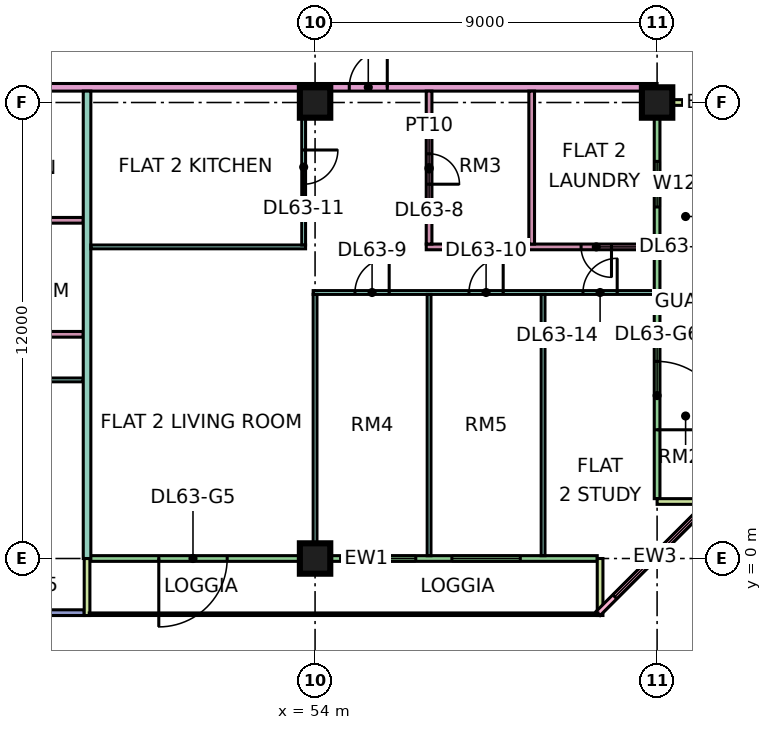
"""IFC4 building model, lengths in metres.
Left out: names, types, materials, properties, quantities, classifications, styles, units other than length and angle.
Written with IfcOpenShell. Run it as: python <this file> out.ifc"""

import sys

from ifc_helpers import new_model, si_unit, direction, frame, frame_2d, origin, origin_2d, place, context, subcontext, project, spatial, rectangle, extrude, element, fill, save


model = new_model("IFC4")
c1 = context("Model", 3, precision=1e-05, world=origin(), true_north=direction((0.0, 1.0)))
c2 = subcontext(c1, "Body", "Model", "MODEL_VIEW")
j1 = project(units=[si_unit("LENGTHUNIT", "METRE"), si_unit("PLANEANGLEUNIT", "RADIAN")], contexts=[c1])
p1 = place(None, origin())
s1 = spatial("IfcSite", under=j1, at=p1, CompositionType="ELEMENT")
p2 = place(p1, origin())
s2 = spatial("IfcBuilding", under=s1, at=p2, CompositionType="ELEMENT")
p3 = place(p2, frame((0.0, 0.0, 273.4)))
s3 = spatial("IfcBuildingStorey", under=s2, at=p3, CompositionType="ELEMENT", Elevation=273.4)
for number, where, z_axis, x_axis in (
    (1, (54.0, 0.0, 0.0), (0.0, 0.0, 1.0), (1.0, 0.0, 0.0)),
    (2, (54.0, 12.0, 0.0), (0.0, 0.0, 1.0), (1.0, 0.0, 0.0)),
    (3, (63.0, 12.0, 0.0), (0.0, 0.0, 1.0), (1.0, 0.0, 0.0)),
):
    element("IfcColumn", number, at=place(p3, frame(where, z_axis=z_axis, x_axis=x_axis)), inside=s3, PredefinedType="COLUMN", context=c2, shape_type="SweptSolid", body=[
        extrude(rectangle(XDim=0.8, YDim=0.8, at=origin_2d()), origin(), (0.0, 0.0, 1.0), 3.75),
    ])
p4 = place(p3, frame((36.075, -1.425, 0.0), z_axis=(0.0, 0.0, 1.0), x_axis=(1.0, 0.0, 0.0)))
e4 = element("IfcWall", 4, at=p4, inside=s3, PredefinedType="SOLIDWALL", context=c2, shape_type="SweptSolid", body=[
    extrude(rectangle(XDim=11.85, YDim=0.15, at=frame_2d((5.925, 0.0))), origin(), (0.0, 0.0, 1.0), 3.35),
])
p5 = place(p4, frame((0.562, 0.0, 0.45)))
e5 = element("IfcOpeningElement", 5, at=p5, cuts=e4, PredefinedType="OPENING", context=c2, shape_type="SweptSolid", body=[
    extrude(rectangle(XDim=1.8, YDim=2.4, at=frame_2d((0.9, 1.2))), frame((0.0, 0.085, 0.0), z_axis=(0.0, -1.0, 0.0), x_axis=(1.0, 0.0, 0.0)), (0.0, 0.0, 1.0), 0.17),
])
p6 = place(p4, frame((5.887, 0.0, 0.45)))
e6 = element("IfcOpeningElement", 6, at=p6, cuts=e4, PredefinedType="OPENING", context=c2, shape_type="SweptSolid", body=[
    extrude(rectangle(XDim=3.0, YDim=2.4, at=frame_2d((1.5, 1.2))), frame((0.0, 0.085, 0.0), z_axis=(0.0, -1.0, 0.0), x_axis=(1.0, 0.0, 0.0)), (0.0, 0.0, 1.0), 0.17),
])
p7 = place(p3, frame((48.075, 0.0, 0.0), z_axis=(0.0, 0.0, 1.0), x_axis=(1.0, 0.0, 0.0)))
e7 = element("IfcWall", 7, at=p7, inside=s3, PredefinedType="SOLIDWALL", context=c2, shape_type="SweptSolid", body=[
    extrude(rectangle(XDim=13.35, YDim=0.15, at=frame_2d((6.675, 0.0))), origin(), (0.0, 0.0, 1.0), 3.35),
])
p8 = place(p7, frame((1.812, 0.0, 0.0)))
e8 = element("IfcOpeningElement", 8, at=p8, cuts=e7, PredefinedType="OPENING", context=c2, shape_type="SweptSolid", body=[
    extrude(rectangle(XDim=1.8, YDim=2.4, at=frame_2d((0.9, 1.2))), frame((0.0, 0.085, 0.0), z_axis=(0.0, -1.0, 0.0), x_axis=(1.0, 0.0, 0.0)), (0.0, 0.0, 1.0), 0.17),
])
p9 = place(p7, frame((6.775, 0.0, 0.45)))
e9 = element("IfcOpeningElement", 9, at=p9, cuts=e7, PredefinedType="OPENING", context=c2, shape_type="SweptSolid", body=[
    extrude(rectangle(XDim=1.8, YDim=2.4, at=frame_2d((0.9, 1.2))), frame((0.0, 0.085, 0.0), z_axis=(0.0, -1.0, 0.0), x_axis=(1.0, 0.0, 0.0)), (0.0, 0.0, 1.0), 0.17),
])
p10 = place(p7, frame((9.525, 0.0, 0.45)))
e10 = element("IfcOpeningElement", 10, at=p10, cuts=e7, PredefinedType="OPENING", context=c2, shape_type="SweptSolid", body=[
    extrude(rectangle(XDim=1.8, YDim=2.4, at=frame_2d((0.9, 1.2))), frame((0.0, 0.085, 0.0), z_axis=(0.0, -1.0, 0.0), x_axis=(1.0, 0.0, 0.0)), (0.0, 0.0, 1.0), 0.17),
])
for number, where, z_axis, x_axis in (
    (11, (48.0, -1.5, 0.0), (0.0, 0.0, 1.0), (0.0, 1.0, 0.0)),
    (12, (61.5, -1.5, 0.0), (0.0, 0.0, 1.0), (0.0, 1.0, 0.0)),
):
    element("IfcWall", number, at=place(p3, frame(where, z_axis=z_axis, x_axis=x_axis)), inside=s3, PredefinedType="SOLIDWALL", context=c2, shape_type="SweptSolid", body=[
        extrude(rectangle(XDim=1.5, YDim=0.15, at=frame_2d((0.75, 0.0))), origin(), (0.0, 0.0, 1.0), 3.35),
    ])
p11 = place(p3, frame((61.447, -1.447, 0.0), z_axis=(0.0, 0.0, 1.0), x_axis=(0.707106781187, 0.707106781187, 0.0)))
e13 = element("IfcWall", 13, at=p11, inside=s3, PredefinedType="SOLIDWALL", context=c2, shape_type="SweptSolid", body=[
    extrude(rectangle(XDim=4.243, YDim=0.15, at=frame_2d((2.121, 0.0))), origin(), (0.0, 0.0, 1.0), 3.35),
])
p12 = place(p11, frame((0.621, 0.0, 0.45)))
e14 = element("IfcOpeningElement", 14, at=p12, cuts=e13, PredefinedType="OPENING", context=c2, shape_type="SweptSolid", body=[
    extrude(rectangle(XDim=3.0, YDim=2.4, at=frame_2d((1.5, 1.2))), frame((0.0, 0.085, 0.0), z_axis=(0.0, -1.0, 0.0), x_axis=(1.0, 0.0, 0.0)), (0.0, 0.0, 1.0), 0.17),
])
p13 = place(p3, frame((63.0, 1.575, 0.0), z_axis=(0.0, 0.0, 1.0), x_axis=(0.0, 1.0, 0.0)))
e15 = element("IfcWall", 15, at=p13, inside=s3, PredefinedType="SOLIDWALL", context=c2, shape_type="SweptSolid", body=[
    extrude(rectangle(XDim=10.35, YDim=0.15, at=frame_2d((5.175, 0.0))), origin(), (0.0, 0.0, 1.0), 3.35),
])
p14 = place(p13, frame((1.812, 0.0, 0.0)))
e16 = element("IfcOpeningElement", 16, at=p14, cuts=e15, PredefinedType="OPENING", context=c2, shape_type="SweptSolid", body=[
    extrude(rectangle(XDim=1.8, YDim=2.4, at=frame_2d((0.9, 1.2))), frame((0.0, 0.085, 0.0), z_axis=(0.0, -1.0, 0.0), x_axis=(1.0, 0.0, 0.0)), (0.0, 0.0, 1.0), 0.17),
])
p15 = place(p13, frame((7.675, 0.0, 1.7)))
e17 = element("IfcOpeningElement", 17, at=p15, cuts=e15, PredefinedType="OPENING", context=c2, shape_type="SweptSolid", body=[
    extrude(rectangle(XDim=1.2, YDim=0.9, at=frame_2d((0.6, 0.45))), frame((0.0, 0.085, 0.0), z_axis=(0.0, -1.0, 0.0), x_axis=(1.0, 0.0, 0.0)), (0.0, 0.0, 1.0), 0.17),
])
for number, where, z_axis, x_axis in (
    (18, (64.5, 1.5, 0.0), (0.0, 0.0, 1.0), (-1.0, 0.0, 0.0)),
    (19, (64.5, 12.0, 0.0), (0.0, 0.0, 1.0), (-1.0, 0.0, 0.0)),
):
    element("IfcWall", number, at=place(p3, frame(where, z_axis=z_axis, x_axis=x_axis)), inside=s3, PredefinedType="SOLIDWALL", context=c2, shape_type="SweptSolid", body=[
        extrude(rectangle(XDim=1.5, YDim=0.15, at=frame_2d((0.75, 0.0))), origin(), (0.0, 0.0, 1.0), 3.35),
    ])
p16 = place(p3, frame((33.05, 4.7, 0.0), z_axis=(0.0, 0.0, 1.0), x_axis=(1.0, 0.0, 0.0)))
e20 = element("IfcWall", 20, at=p16, inside=s3, PredefinedType="PARTITIONING", context=c2, shape_type="SweptSolid", body=[
    extrude(rectangle(XDim=14.85, YDim=0.1, at=frame_2d((7.425, 0.0))), origin(), (0.0, 0.0, 1.0), 3.35),
])
p17 = place(p16, frame((1.0, 0.0, 0.0)))
e21 = element("IfcOpeningElement", 21, at=p17, cuts=e20, PredefinedType="OPENING", context=c2, shape_type="SweptSolid", body=[
    extrude(rectangle(XDim=0.9, YDim=2.1, at=frame_2d((0.45, 1.05))), frame((0.0, 0.06, 0.0), z_axis=(0.0, -1.0, 0.0), x_axis=(1.0, 0.0, 0.0)), (0.0, 0.0, 1.0), 0.12),
])
p18 = place(p16, frame((4.0, 0.0, 0.0)))
e22 = element("IfcOpeningElement", 22, at=p18, cuts=e20, PredefinedType="OPENING", context=c2, shape_type="SweptSolid", body=[
    extrude(rectangle(XDim=0.9, YDim=2.1, at=frame_2d((0.45, 1.05))), frame((0.0, 0.06, 0.0), z_axis=(0.0, -1.0, 0.0), x_axis=(1.0, 0.0, 0.0)), (0.0, 0.0, 1.0), 0.12),
])
p19 = place(p16, frame((10.0, 0.0, 0.0)))
e23 = element("IfcOpeningElement", 23, at=p19, cuts=e20, PredefinedType="OPENING", context=c2, shape_type="SweptSolid", body=[
    extrude(rectangle(XDim=0.9, YDim=2.1, at=frame_2d((0.45, 1.05))), frame((0.0, 0.06, 0.0), z_axis=(0.0, -1.0, 0.0), x_axis=(1.0, 0.0, 0.0)), (0.0, 0.0, 1.0), 0.12),
])
p20 = place(p3, frame((40.65, 12.4, 0.0), z_axis=(0.0, 0.0, 1.0), x_axis=(1.0, 0.0, 0.0)))
e24 = element("IfcWall", 24, at=p20, inside=s3, PredefinedType="PARTITIONING", context=c2, shape_type="SweptSolid", body=[
    extrude(rectangle(XDim=22.35, YDim=0.2, at=frame_2d((11.175, 0.0))), origin(), (0.0, 0.0, 1.0), 3.35),
])
p21 = place(p20, frame((14.25, 0.0, 0.0)))
e25 = element("IfcOpeningElement", 25, at=p21, cuts=e24, PredefinedType="OPENING", context=c2, shape_type="SweptSolid", body=[
    extrude(rectangle(XDim=1.0, YDim=2.1, at=frame_2d((0.5, 1.05))), frame((0.0, 0.11, 0.0), z_axis=(0.0, -1.0, 0.0), x_axis=(1.0, 0.0, 0.0)), (0.0, 0.0, 1.0), 0.22),
])
p22 = place(p20, frame((1.05, 0.0, 0.0)))
e26 = element("IfcOpeningElement", 26, at=p22, cuts=e24, PredefinedType="OPENING", context=c2, shape_type="SweptSolid", body=[
    extrude(rectangle(XDim=1.0, YDim=2.1, at=frame_2d((0.5, 1.05))), frame((0.0, 0.11, 0.0), z_axis=(0.0, -1.0, 0.0), x_axis=(1.0, 0.0, 0.0)), (0.0, 0.0, 1.0), 0.22),
])
p23 = place(p3, frame((43.725, 5.9, 0.0), z_axis=(0.0, 0.0, 1.0), x_axis=(1.0, 0.0, 0.0)))
e27 = element("IfcWall", 27, at=p23, inside=s3, PredefinedType="PARTITIONING", context=c2, shape_type="SweptSolid", body=[
    extrude(rectangle(XDim=4.175, YDim=0.15, at=frame_2d((2.087, 0.0))), origin(), (0.0, 0.0, 1.0), 3.35),
])
p24 = place(p23, frame((1.675, 0.0, 0.0)))
e28 = element("IfcOpeningElement", 28, at=p24, cuts=e27, PredefinedType="OPENING", context=c2, shape_type="SweptSolid", body=[
    extrude(rectangle(XDim=0.8, YDim=2.1, at=frame_2d((0.4, 1.05))), frame((0.0, 0.085, 0.0), z_axis=(0.0, -1.0, 0.0), x_axis=(1.0, 0.0, 0.0)), (0.0, 0.0, 1.0), 0.17),
])
p25 = place(p3, frame((43.725, 8.9, 0.0), z_axis=(0.0, 0.0, 1.0), x_axis=(1.0, 0.0, 0.0)))
e29 = element("IfcWall", 29, at=p25, inside=s3, PredefinedType="PARTITIONING", context=c2, shape_type="SweptSolid", body=[
    extrude(rectangle(XDim=4.175, YDim=0.15, at=frame_2d((2.087, 0.0))), origin(), (0.0, 0.0, 1.0), 3.35),
])
p26 = place(p3, frame((48.0, 0.0, 0.0), z_axis=(0.0, 0.0, 1.0), x_axis=(0.0, 1.0, 0.0)))
e30 = element("IfcWall", 30, at=p26, inside=s3, PredefinedType="PARTITIONING", context=c2, shape_type="SweptSolid", body=[
    extrude(rectangle(XDim=12.3, YDim=0.2, at=frame_2d((6.15, 0.0))), origin(), (0.0, 0.0, 1.0), 3.35),
])
p27 = place(p3, frame((48.1, 8.2, 0.0), z_axis=(0.0, 0.0, 1.0), x_axis=(1.0, 0.0, 0.0)))
e31 = element("IfcWall", 31, at=p27, inside=s3, PredefinedType="PARTITIONING", context=c2, shape_type="SweptSolid", body=[
    extrude(rectangle(XDim=5.65, YDim=0.1, at=frame_2d((2.825, 0.0))), origin(), (0.0, 0.0, 1.0), 3.35),
])
p28 = place(p3, frame((53.7, 8.25, 0.0), z_axis=(0.0, 0.0, 1.0), x_axis=(0.0, 1.0, 0.0)))
e32 = element("IfcWall", 32, at=p28, inside=s3, PredefinedType="PARTITIONING", context=c2, shape_type="SweptSolid", body=[
    extrude(rectangle(XDim=4.05, YDim=0.1, at=frame_2d((2.025, 0.0))), origin(), (0.0, 0.0, 1.0), 3.35),
])
p29 = place(p28, frame((1.6, 0.0, 0.0)))
e33 = element("IfcOpeningElement", 33, at=p29, cuts=e32, PredefinedType="OPENING", context=c2, shape_type="SweptSolid", body=[
    extrude(rectangle(XDim=0.9, YDim=2.1, at=frame_2d((0.45, 1.05))), frame((0.0, 0.06, 0.0), z_axis=(0.0, -1.0, 0.0), x_axis=(1.0, 0.0, 0.0)), (0.0, 0.0, 1.0), 0.12),
])
p30 = place(p3, frame((53.95, 7.0, 0.0), z_axis=(0.0, 0.0, 1.0), x_axis=(1.0, 0.0, 0.0)))
e34 = element("IfcWall", 34, at=p30, inside=s3, PredefinedType="PARTITIONING", context=c2, shape_type="SweptSolid", body=[
    extrude(rectangle(XDim=8.976, YDim=0.1, at=frame_2d((4.488, 0.0))), origin(), (0.0, 0.0, 1.0), 3.35),
])
p31 = place(p30, frame((1.1, 0.0, 0.0)))
e35 = element("IfcOpeningElement", 35, at=p31, cuts=e34, PredefinedType="OPENING", context=c2, shape_type="SweptSolid", body=[
    extrude(rectangle(XDim=0.9, YDim=2.1, at=frame_2d((0.45, 1.05))), frame((0.0, 0.06, 0.0), z_axis=(0.0, -1.0, 0.0), x_axis=(1.0, 0.0, 0.0)), (0.0, 0.0, 1.0), 0.12),
])
p32 = place(p30, frame((4.1, 0.0, 0.0)))
e36 = element("IfcOpeningElement", 36, at=p32, cuts=e34, PredefinedType="OPENING", context=c2, shape_type="SweptSolid", body=[
    extrude(rectangle(XDim=0.9, YDim=2.1, at=frame_2d((0.45, 1.05))), frame((0.0, 0.06, 0.0), z_axis=(0.0, -1.0, 0.0), x_axis=(1.0, 0.0, 0.0)), (0.0, 0.0, 1.0), 0.12),
])
p33 = place(p30, frame((7.1, 0.0, 0.0)))
e37 = element("IfcOpeningElement", 37, at=p33, cuts=e34, PredefinedType="OPENING", context=c2, shape_type="SweptSolid", body=[
    extrude(rectangle(XDim=0.9, YDim=2.1, at=frame_2d((0.45, 1.05))), frame((0.0, 0.06, 0.0), z_axis=(0.0, -1.0, 0.0), x_axis=(1.0, 0.0, 0.0)), (0.0, 0.0, 1.0), 0.12),
])
p34 = place(p3, frame((54.0, 0.074, 0.0), z_axis=(0.0, 0.0, 1.0), x_axis=(0.0, 1.0, 0.0)))
e38 = element("IfcWall", 38, at=p34, inside=s3, PredefinedType="PARTITIONING", context=c2, shape_type="SweptSolid", body=[
    extrude(rectangle(XDim=6.876, YDim=0.1, at=frame_2d((3.438, 0.0))), origin(), (0.0, 0.0, 1.0), 3.35),
])
p35 = place(p3, frame((56.925, 8.2, 0.0), z_axis=(0.0, 0.0, 1.0), x_axis=(1.0, 0.0, 0.0)))
e39 = element("IfcWall", 39, at=p35, inside=s3, PredefinedType="PARTITIONING", context=c2, shape_type="SweptSolid", body=[
    extrude(rectangle(XDim=6.001, YDim=0.15, at=frame_2d((3.0, 0.0))), origin(), (0.0, 0.0, 1.0), 3.35),
])
p36 = place(p35, frame((4.075, 0.0, 0.0)))
e40 = element("IfcOpeningElement", 40, at=p36, cuts=e39, PredefinedType="OPENING", context=c2, shape_type="SweptSolid", body=[
    extrude(rectangle(XDim=0.8, YDim=2.1, at=frame_2d((0.4, 1.05))), frame((0.0, 0.085, 0.0), z_axis=(0.0, -1.0, 0.0), x_axis=(1.0, 0.0, 0.0)), (0.0, 0.0, 1.0), 0.17),
])
p37 = place(p3, frame((57.0, 0.074, 0.0), z_axis=(0.0, 0.0, 1.0), x_axis=(0.0, 1.0, 0.0)))
e41 = element("IfcWall", 41, at=p37, inside=s3, PredefinedType="PARTITIONING", context=c2, shape_type="SweptSolid", body=[
    extrude(rectangle(XDim=6.876, YDim=0.1, at=frame_2d((3.438, 0.0))), origin(), (0.0, 0.0, 1.0), 3.35),
])
p38 = place(p3, frame((57.0, 8.275, 0.0), z_axis=(0.0, 0.0, 1.0), x_axis=(0.0, 1.0, 0.0)))
e42 = element("IfcWall", 42, at=p38, inside=s3, PredefinedType="PARTITIONING", context=c2, shape_type="SweptSolid", body=[
    extrude(rectangle(XDim=4.025, YDim=0.15, at=frame_2d((2.013, 0.0))), origin(), (0.0, 0.0, 1.0), 3.35),
])
p39 = place(p38, frame((1.575, 0.0, 0.0)))
e43 = element("IfcOpeningElement", 43, at=p39, cuts=e42, PredefinedType="OPENING", context=c2, shape_type="SweptSolid", body=[
    extrude(rectangle(XDim=0.8, YDim=2.1, at=frame_2d((0.4, 1.05))), frame((0.0, 0.085, 0.0), z_axis=(0.0, -1.0, 0.0), x_axis=(1.0, 0.0, 0.0)), (0.0, 0.0, 1.0), 0.17),
])
p40 = place(p3, frame((59.7, 8.275, 0.0), z_axis=(0.0, 0.0, 1.0), x_axis=(0.0, 1.0, 0.0)))
e44 = element("IfcWall", 44, at=p40, inside=s3, PredefinedType="PARTITIONING", context=c2, shape_type="SweptSolid", body=[
    extrude(rectangle(XDim=4.025, YDim=0.15, at=frame_2d((2.013, 0.0))), origin(), (0.0, 0.0, 1.0), 3.35),
])
p41 = place(p3, frame((60.0, 0.074, 0.0), z_axis=(0.0, 0.0, 1.0), x_axis=(0.0, 1.0, 0.0)))
e45 = element("IfcWall", 45, at=p41, inside=s3, PredefinedType="PARTITIONING", context=c2, shape_type="SweptSolid", body=[
    extrude(rectangle(XDim=6.876, YDim=0.1, at=frame_2d((3.438, 0.0))), origin(), (0.0, 0.0, 1.0), 3.35),
])
p42 = place(p8, frame((1.8, 0.0, 0.0), z_axis=(0.0, 0.0, 1.0), x_axis=(-1.0, 0.0, 0.0)))
e46 = element("IfcDoor", 46, at=p42, inside=s3, OperationType="DOUBLE_DOOR_SINGLE_SWING", PredefinedType="DOOR", context=c2, shape_type="SweptSolid", body=[
    extrude(rectangle(XDim=1.8, YDim=2.4, at=frame_2d((0.9, 1.2))), frame((0.0, 0.025, 0.0), z_axis=(0.0, -1.0, 0.0), x_axis=(1.0, 0.0, 0.0)), (0.0, 0.0, 1.0), 0.05),
])
fill(e8, e46)
p43 = place(p9, origin())
e47 = element("IfcWindow", 47, at=p43, inside=s3, PartitioningType="SINGLE_PANEL", PredefinedType="WINDOW", context=c2, shape_type="SweptSolid", body=[
    extrude(rectangle(XDim=1.8, YDim=2.4, at=frame_2d((0.9, 1.2))), frame((0.0, 0.03, 0.0), z_axis=(0.0, -1.0, 0.0), x_axis=(1.0, 0.0, 0.0)), (0.0, 0.0, 1.0), 0.06),
])
fill(e9, e47)
p44 = place(p10, origin())
e48 = element("IfcWindow", 48, at=p44, inside=s3, PartitioningType="SINGLE_PANEL", PredefinedType="WINDOW", context=c2, shape_type="SweptSolid", body=[
    extrude(rectangle(XDim=1.8, YDim=2.4, at=frame_2d((0.9, 1.2))), frame((0.0, 0.03, 0.0), z_axis=(0.0, -1.0, 0.0), x_axis=(1.0, 0.0, 0.0)), (0.0, 0.0, 1.0), 0.06),
])
fill(e10, e48)
p45 = place(p12, origin())
e49 = element("IfcWindow", 49, at=p45, inside=s3, PartitioningType="SINGLE_PANEL", PredefinedType="WINDOW", context=c2, shape_type="SweptSolid", body=[
    extrude(rectangle(XDim=3.0, YDim=2.4, at=frame_2d((1.5, 1.2))), frame((0.0, 0.03, 0.0), z_axis=(0.0, -1.0, 0.0), x_axis=(1.0, 0.0, 0.0)), (0.0, 0.0, 1.0), 0.06),
])
fill(e14, e49)
p46 = place(p14, frame((1.8, 0.0, 0.0), z_axis=(0.0, 0.0, 1.0), x_axis=(-1.0, 0.0, 0.0)))
e50 = element("IfcDoor", 50, at=p46, inside=s3, OperationType="DOUBLE_DOOR_SINGLE_SWING", PredefinedType="DOOR", context=c2, shape_type="SweptSolid", body=[
    extrude(rectangle(XDim=1.8, YDim=2.4, at=frame_2d((0.9, 1.2))), frame((0.0, 0.025, 0.0), z_axis=(0.0, -1.0, 0.0), x_axis=(1.0, 0.0, 0.0)), (0.0, 0.0, 1.0), 0.05),
])
fill(e16, e50)
p47 = place(p15, origin())
e51 = element("IfcWindow", 51, at=p47, inside=s3, PartitioningType="SINGLE_PANEL", PredefinedType="WINDOW", context=c2, shape_type="SweptSolid", body=[
    extrude(rectangle(XDim=1.2, YDim=0.9, at=frame_2d((0.6, 0.45))), frame((0.0, 0.03, 0.0), z_axis=(0.0, -1.0, 0.0), x_axis=(1.0, 0.0, 0.0)), (0.0, 0.0, 1.0), 0.06),
])
fill(e17, e51)
p48 = place(p39, frame((0.8, 0.0, 0.0), z_axis=(0.0, 0.0, 1.0), x_axis=(-1.0, 0.0, 0.0)))
e52 = element("IfcDoor", 52, at=p48, inside=s3, OperationType="SINGLE_SWING_LEFT", PredefinedType="DOOR", context=c2, shape_type="SweptSolid", body=[
    extrude(rectangle(XDim=0.8, YDim=2.1, at=frame_2d((0.4, 1.05))), frame((0.0, 0.025, 0.0), z_axis=(0.0, -1.0, 0.0), x_axis=(1.0, 0.0, 0.0)), (0.0, 0.0, 1.0), 0.05),
])
fill(e43, e52)
p49 = place(p31, frame((0.9, 0.0, 0.0), z_axis=(0.0, 0.0, 1.0), x_axis=(-1.0, 0.0, 0.0)))
e53 = element("IfcDoor", 53, at=p49, inside=s3, OperationType="SINGLE_SWING_RIGHT", PredefinedType="DOOR", context=c2, shape_type="SweptSolid", body=[
    extrude(rectangle(XDim=0.9, YDim=2.1, at=frame_2d((0.45, 1.05))), frame((0.0, 0.025, 0.0), z_axis=(0.0, -1.0, 0.0), x_axis=(1.0, 0.0, 0.0)), (0.0, 0.0, 1.0), 0.05),
])
fill(e35, e53)
p50 = place(p32, frame((0.9, 0.0, 0.0), z_axis=(0.0, 0.0, 1.0), x_axis=(-1.0, 0.0, 0.0)))
e54 = element("IfcDoor", 54, at=p50, inside=s3, OperationType="SINGLE_SWING_RIGHT", PredefinedType="DOOR", context=c2, shape_type="SweptSolid", body=[
    extrude(rectangle(XDim=0.9, YDim=2.1, at=frame_2d((0.45, 1.05))), frame((0.0, 0.025, 0.0), z_axis=(0.0, -1.0, 0.0), x_axis=(1.0, 0.0, 0.0)), (0.0, 0.0, 1.0), 0.05),
])
fill(e36, e54)
p51 = place(p29, origin())
e55 = element("IfcDoor", 55, at=p51, inside=s3, OperationType="SINGLE_SWING_RIGHT", PredefinedType="DOOR", context=c2, shape_type="SweptSolid", body=[
    extrude(rectangle(XDim=0.9, YDim=2.1, at=frame_2d((0.45, 1.05))), frame((0.0, 0.025, 0.0), z_axis=(0.0, -1.0, 0.0), x_axis=(1.0, 0.0, 0.0)), (0.0, 0.0, 1.0), 0.05),
])
fill(e33, e55)
p52 = place(p36, origin())
e56 = element("IfcDoor", 56, at=p52, inside=s3, OperationType="SINGLE_SWING_RIGHT", PredefinedType="DOOR", context=c2, shape_type="SweptSolid", body=[
    extrude(rectangle(XDim=0.8, YDim=2.1, at=frame_2d((0.4, 1.05))), frame((0.0, 0.025, 0.0), z_axis=(0.0, -1.0, 0.0), x_axis=(1.0, 0.0, 0.0)), (0.0, 0.0, 1.0), 0.05),
])
fill(e40, e56)
p53 = place(p21, frame((1.0, 0.0, 0.0), z_axis=(0.0, 0.0, 1.0), x_axis=(-1.0, 0.0, 0.0)))
e57 = element("IfcDoor", 57, at=p53, inside=s3, OperationType="SINGLE_SWING_RIGHT", PredefinedType="DOOR", context=c2, shape_type="SweptSolid", body=[
    extrude(rectangle(XDim=1.0, YDim=2.1, at=frame_2d((0.5, 1.05))), frame((0.0, 0.025, 0.0), z_axis=(0.0, -1.0, 0.0), x_axis=(1.0, 0.0, 0.0)), (0.0, 0.0, 1.0), 0.05),
])
fill(e25, e57)
p54 = place(p33, frame((0.9, 0.0, 0.0), z_axis=(0.0, 0.0, 1.0), x_axis=(-1.0, 0.0, 0.0)))
e58 = element("IfcDoor", 58, at=p54, inside=s3, OperationType="SINGLE_SWING_RIGHT", PredefinedType="DOOR", context=c2, shape_type="SweptSolid", body=[
    extrude(rectangle(XDim=0.9, YDim=2.1, at=frame_2d((0.45, 1.05))), frame((0.0, 0.025, 0.0), z_axis=(0.0, -1.0, 0.0), x_axis=(1.0, 0.0, 0.0)), (0.0, 0.0, 1.0), 0.05),
])
fill(e37, e58)
save(model, sys.argv[1])
